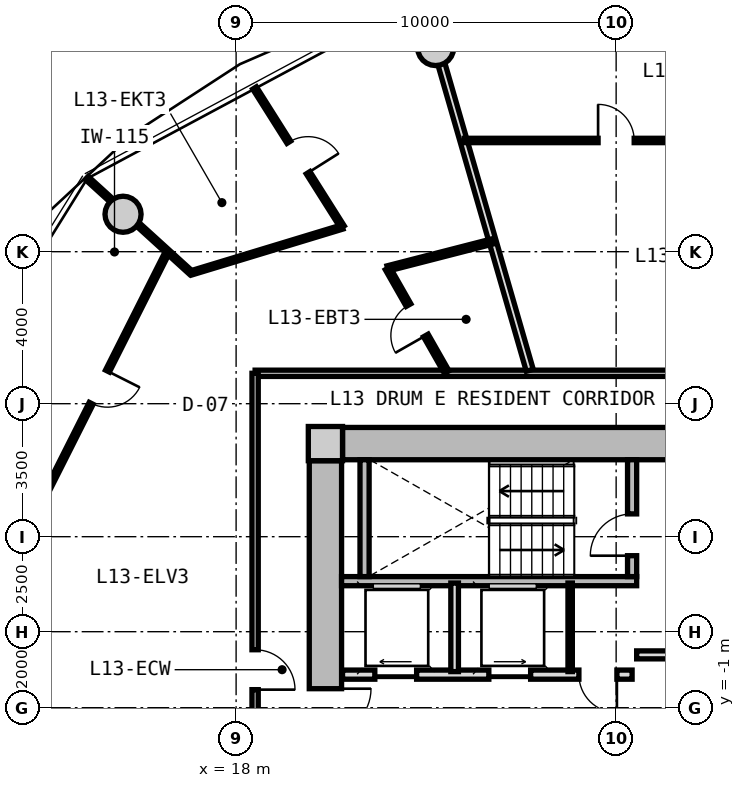
"""IFC4 building model, lengths in metres.
Left out: names, types, materials, properties, quantities, classifications, styles, units other than length and angle.
Written with IfcOpenShell. Run it as: python <this file> out.ifc"""

import sys

from ifc_helpers import new_model, si_unit, direction, frame, frame_2d, origin, origin_2d, place, context, subcontext, project, spatial, rectangle, circle, extrude, source, transform, mapped, element, fill, save


model = new_model("IFC4")
c1 = context("Model", 3, precision=1e-05, world=origin(), true_north=direction((0.0, 1.0)))
c2 = subcontext(c1, "Body", "Model", "MODEL_VIEW")
j1 = project(units=[si_unit("LENGTHUNIT", "METRE"), si_unit("PLANEANGLEUNIT", "RADIAN")], contexts=[c1])
p1 = place(None, origin())
s1 = spatial("IfcSite", under=j1, at=p1, CompositionType="ELEMENT")
p2 = place(p1, origin())
s2 = spatial("IfcBuilding", under=s1, at=p2, CompositionType="ELEMENT")
p3 = place(p2, frame((0.0, 0.0, 46.0)))
s3 = spatial("IfcBuildingStorey", under=s2, at=p3, CompositionType="ELEMENT", Elevation=46.0)
m1 = source(origin(), c2, "Body", "SweptSolid", [
    extrude(rectangle(XDim=0.9, YDim=0.9, at=origin_2d()), origin(), (0.0, 0.0, 1.0), 3.05),
])
p4 = place(p3, frame((20.35, 5.95, 0.0), z_axis=(0.0, 0.0, 1.0), x_axis=(1.0, 0.0, 0.0)))
e1 = element("IfcColumn", 1, at=p4, inside=s3, PredefinedType="COLUMN", context=c2, shape_type="MappedRepresentation", body=[
    mapped(m1, transform((0.0, 0.0, 0.0), x_axis=(1.0, 0.0, 0.0), y_axis=(0.0, 1.0, 0.0), z_axis=(0.0, 0.0, 1.0), scale=1.0)),
])
m2 = source(origin(), c2, "Body", "SweptSolid", [
    extrude(rectangle(XDim=14.4, YDim=0.85, at=frame_2d((7.2, 0.0))), origin(), (0.0, 0.0, 1.0), 2.79),
])
p5 = place(p3, frame((20.8, 5.95, 0.0), z_axis=(0.0, 0.0, 1.0), x_axis=(1.0, 0.0, 0.0)))
e2 = element("IfcWall", 2, at=p5, inside=s3, PredefinedType="SHEAR", context=c2, shape_type="MappedRepresentation", body=[
    mapped(m2, transform((0.0, 0.0, 0.0), x_axis=(1.0, 0.0, 0.0), y_axis=(0.0, 1.0, 0.0), z_axis=(0.0, 0.0, 1.0), scale=1.0)),
])
m3 = source(origin(), c2, "Body", "SweptSolid", [
    extrude(rectangle(XDim=11.0, YDim=0.85, at=frame_2d((5.5, 0.0))), origin(), (0.0, 0.0, 1.0), 2.79),
])
p6 = place(p3, frame((20.35, -5.5, 0.0), z_axis=(0.0, 0.0, 1.0), x_axis=(0.0, 1.0, 0.0)))
e3 = element("IfcWall", 3, at=p6, inside=s3, PredefinedType="SHEAR", context=c2, shape_type="MappedRepresentation", body=[
    mapped(m3, transform((0.0, 0.0, 0.0), x_axis=(1.0, 0.0, 0.0), y_axis=(0.0, 1.0, 0.0), z_axis=(0.0, 0.0, 1.0), scale=1.0)),
])
p7 = place(p6, frame((3.8, 0.0, 0.0)))
e4 = element("IfcOpeningElement", 4, at=p7, cuts=e3, PredefinedType="OPENING", context=c2, shape_type="SweptSolid", body=[
    extrude(rectangle(XDim=1.2, YDim=2.15, at=frame_2d((0.6, 1.075))), frame((0.0, 0.435, 0.0), z_axis=(0.0, -1.0, 0.0), x_axis=(1.0, 0.0, 0.0)), (0.0, 0.0, 1.0), 0.87),
])
m4 = source(origin(), c2, "Body", "SweptSolid", [
    extrude(circle(Radius=0.475, at=origin_2d()), origin(), (0.0, 0.0, 1.0), 3.05),
])
for number, where, z_axis, x_axis in (
    (5, (23.251, 16.373, 0.0), (0.0, 0.0, 1.0), (1.0, 0.0, 0.0)),
    (6, (15.025, 11.985, 0.0), (0.0, 0.0, 1.0), (1.0, 0.0, 0.0)),
):
    element("IfcColumn", number, at=place(p3, frame(where, z_axis=z_axis, x_axis=x_axis)), inside=s3, PredefinedType="COLUMN", context=c2, shape_type="MappedRepresentation", body=[
        mapped(m4, transform((0.0, 0.0, 0.0), x_axis=(1.0, 0.0, 0.0), y_axis=(0.0, 1.0, 0.0), z_axis=(0.0, 0.0, 1.0), scale=1.0)),
    ])
m5 = source(origin(), c2, "Body", "SweptSolid", [
    extrude(rectangle(XDim=7.765, YDim=0.24, at=frame_2d((3.883, 0.0))), origin(), (0.0, 0.0, 1.0), 2.79),
])
p8 = place(p3, frame((20.775, 2.33, 0.0), z_axis=(0.0, 0.0, 1.0), x_axis=(1.0, 0.0, 0.0)))
e7 = element("IfcWall", 7, at=p8, inside=s3, PredefinedType="PARTITIONING", context=c2, shape_type="MappedRepresentation", body=[
    mapped(m5, transform((0.0, 0.0, 0.0), x_axis=(1.0, 0.0, 0.0), y_axis=(0.0, 1.0, 0.0), z_axis=(0.0, 0.0, 1.0), scale=1.0)),
])
m6 = source(origin(), c2, "Body", "SweptSolid", [
    extrude(rectangle(XDim=3.075, YDim=0.24, at=frame_2d((1.538, 0.0))), origin(), (0.0, 0.0, 1.0), 2.79),
])
p9 = place(p3, frame((21.38, 2.45, 0.0), z_axis=(0.0, 0.0, 1.0), x_axis=(0.0, 1.0, 0.0)))
e8 = element("IfcWall", 8, at=p9, inside=s3, PredefinedType="PARTITIONING", context=c2, shape_type="MappedRepresentation", body=[
    mapped(m6, transform((0.0, 0.0, 0.0), x_axis=(1.0, 0.0, 0.0), y_axis=(0.0, 1.0, 0.0), z_axis=(0.0, 0.0, 1.0), scale=1.0)),
])
p10 = place(p3, frame((28.42, 2.45, 0.0), z_axis=(0.0, 0.0, 1.0), x_axis=(0.0, 1.0, 0.0)))
e9 = element("IfcWall", 9, at=p10, inside=s3, PredefinedType="PARTITIONING", context=c2, shape_type="MappedRepresentation", body=[
    mapped(m6, transform((0.0, 0.0, 0.0), x_axis=(1.0, 0.0, 0.0), y_axis=(0.0, 1.0, 0.0), z_axis=(0.0, 0.0, 1.0), scale=1.0)),
])
p11 = place(p10, frame((0.55, 0.0, 0.0)))
e10 = element("IfcOpeningElement", 10, at=p11, cuts=e9, PredefinedType="OPENING", context=c2, shape_type="SweptSolid", body=[
    extrude(rectangle(XDim=1.1, YDim=2.15, at=frame_2d((0.55, 1.075))), frame((0.0, 0.13, 0.0), z_axis=(0.0, -1.0, 0.0), x_axis=(1.0, 0.0, 0.0)), (0.0, 0.0, 1.0), 0.26),
])
m7 = source(origin(), c2, "Body", "SweptSolid", [
    extrude(rectangle(XDim=6.66, YDim=0.21, at=frame_2d((3.33, 0.0))), origin(), (0.0, 0.0, 1.0), 2.775),
])
p12 = place(p3, frame((28.54, 0.39, 0.0), z_axis=(0.0, 0.0, 1.0), x_axis=(1.0, 0.0, 0.0)))
e11 = element("IfcWall", 11, at=p12, inside=s3, PredefinedType="PARTITIONING", context=c2, shape_type="MappedRepresentation", body=[
    mapped(m7, transform((0.0, 0.0, 0.0), x_axis=(1.0, 0.0, 0.0), y_axis=(0.0, 1.0, 0.0), z_axis=(0.0, 0.0, 1.0), scale=1.0)),
])
p13 = place(p12, frame((1.0, 0.0, 0.0)))
e12 = element("IfcOpeningElement", 12, at=p13, cuts=e11, PredefinedType="OPENING", context=c2, shape_type="SweptSolid", body=[
    extrude(rectangle(XDim=1.2, YDim=2.15, at=frame_2d((0.6, 1.075))), frame((0.0, 0.115, 0.0), z_axis=(0.0, -1.0, 0.0), x_axis=(1.0, 0.0, 0.0)), (0.0, 0.0, 1.0), 0.23),
])
m8 = source(origin(), c2, "Body", "SweptSolid", [
    extrude(rectangle(XDim=7.62, YDim=0.24, at=frame_2d((3.81, 0.0))), origin(), (0.0, 0.0, 1.0), 2.775),
])
p14 = place(p3, frame((20.8, -0.13, 0.0), z_axis=(0.0, 0.0, 1.0), x_axis=(1.0, 0.0, 0.0)))
e13 = element("IfcWall", 13, at=p14, inside=s3, PredefinedType="PARTITIONING", context=c2, shape_type="MappedRepresentation", body=[
    mapped(m8, transform((0.0, 0.0, 0.0), x_axis=(1.0, 0.0, 0.0), y_axis=(0.0, 1.0, 0.0), z_axis=(0.0, 0.0, 1.0), scale=1.0)),
])
p15 = place(p14, frame((6.22, 0.0, 0.0)))
e14 = element("IfcOpeningElement", 14, at=p15, cuts=e13, PredefinedType="OPENING", context=c2, shape_type="SweptSolid", body=[
    extrude(rectangle(XDim=1.0, YDim=2.1, at=frame_2d((0.5, 1.05))), frame((0.0, 0.13, 0.0), z_axis=(0.0, -1.0, 0.0), x_axis=(1.0, 0.0, 0.0)), (0.0, 0.0, 1.0), 0.26),
])
p16 = place(p14, frame((0.85, 0.0, 0.0)))
e15 = element("IfcOpeningElement", 15, at=p16, cuts=e13, PredefinedType="OPENING", context=c2, shape_type="SweptSolid", body=[
    extrude(rectangle(XDim=1.1, YDim=2.2, at=frame_2d((0.55, 1.1))), frame((0.0, 0.13, 0.0), z_axis=(0.0, -1.0, 0.0), x_axis=(1.0, 0.0, 0.0)), (0.0, 0.0, 1.0), 0.26),
])
p17 = place(p14, frame((3.85, 0.0, 0.0)))
e16 = element("IfcOpeningElement", 16, at=p17, cuts=e13, PredefinedType="OPENING", context=c2, shape_type="SweptSolid", body=[
    extrude(rectangle(XDim=1.1, YDim=2.2, at=frame_2d((0.55, 1.1))), frame((0.0, 0.13, 0.0), z_axis=(0.0, -1.0, 0.0), x_axis=(1.0, 0.0, 0.0)), (0.0, 0.0, 1.0), 0.26),
])
m9 = source(origin(), c2, "Body", "SweptSolid", [
    extrude(rectangle(XDim=2.33, YDim=0.115, at=frame_2d((1.165, 0.0))), origin(), (0.0, 0.0, 1.0), 2.775),
])
p18 = place(p3, frame((26.79, -0.05, 0.0), z_axis=(0.0, 0.0, 1.0), x_axis=(0.0, 1.0, 0.0)))
e17 = element("IfcWall", 17, at=p18, inside=s3, PredefinedType="PARTITIONING", context=c2, shape_type="MappedRepresentation", body=[
    mapped(m9, transform((0.0, 0.0, 0.0), x_axis=(1.0, 0.0, 0.0), y_axis=(0.0, 1.0, 0.0), z_axis=(0.0, 0.0, 1.0), scale=1.0)),
])
m10 = source(origin(), c2, "Body", "SweptSolid", [
    extrude(rectangle(XDim=2.33, YDim=0.2, at=frame_2d((1.165, 0.0))), origin(), (0.0, 0.0, 1.0), 2.775),
])
p19 = place(p3, frame((23.75, -0.05, 0.0), z_axis=(0.0, 0.0, 1.0), x_axis=(0.0, 1.0, 0.0)))
e18 = element("IfcWall", 18, at=p19, inside=s3, PredefinedType="PARTITIONING", context=c2, shape_type="MappedRepresentation", body=[
    mapped(m10, transform((0.0, 0.0, 0.0), x_axis=(1.0, 0.0, 0.0), y_axis=(0.0, 1.0, 0.0), z_axis=(0.0, 0.0, 1.0), scale=1.0)),
])
m11 = source(origin(), c2, "Body", "SweptSolid", [
    extrude(rectangle(XDim=19.0, YDim=0.165, at=frame_2d((9.5, 0.0))), origin(), (0.0, 0.0, 1.0), 2.775),
])
p20 = place(p3, frame((18.5, 7.8, 0.0), z_axis=(0.0, 0.0, 1.0), x_axis=(1.0, 0.0, 0.0)))
e19 = element("IfcWall", 19, at=p20, inside=s3, PredefinedType="PARTITIONING", context=c2, shape_type="MappedRepresentation", body=[
    mapped(m11, transform((0.0, 0.0, 0.0), x_axis=(1.0, 0.0, 0.0), y_axis=(0.0, 1.0, 0.0), z_axis=(0.0, 0.0, 1.0), scale=1.0)),
])
p21 = place(p20, frame((12.462, 0.0, 0.0)))
e20 = element("IfcOpeningElement", 20, at=p21, cuts=e19, PredefinedType="OPENING", context=c2, shape_type="SweptSolid", body=[
    extrude(rectangle(XDim=1.05, YDim=2.15, at=frame_2d((0.525, 1.075))), frame((0.0, 0.093, 0.0), z_axis=(0.0, -1.0, 0.0), x_axis=(1.0, 0.0, 0.0)), (0.0, 0.0, 1.0), 0.185),
])
m12 = source(origin(), c2, "Body", "SweptSolid", [
    extrude(rectangle(XDim=15.6, YDim=0.165, at=frame_2d((7.8, 0.0))), origin(), (0.0, 0.0, 1.0), 2.775),
])
p22 = place(p3, frame((18.5, -7.8, 0.0), z_axis=(0.0, 0.0, 1.0), x_axis=(0.0, 1.0, 0.0)))
e21 = element("IfcWall", 21, at=p22, inside=s3, PredefinedType="PARTITIONING", context=c2, shape_type="MappedRepresentation", body=[
    mapped(m12, transform((0.0, 0.0, 0.0), x_axis=(1.0, 0.0, 0.0), y_axis=(0.0, 1.0, 0.0), z_axis=(0.0, 0.0, 1.0), scale=1.0)),
])
p23 = place(p22, frame((7.275, 0.0, 0.0)))
e22 = element("IfcOpeningElement", 22, at=p23, cuts=e21, PredefinedType="OPENING", context=c2, shape_type="SweptSolid", body=[
    extrude(rectangle(XDim=1.05, YDim=2.15, at=frame_2d((0.525, 1.075))), frame((0.0, 0.093, 0.0), z_axis=(0.0, -1.0, 0.0), x_axis=(1.0, 0.0, 0.0)), (0.0, 0.0, 1.0), 0.185),
])
m13 = source(origin(), c2, "Body", "SweptSolid", [
    extrude(rectangle(XDim=10.196, YDim=0.19, at=frame_2d((5.098, 0.0))), origin(), (0.0, 0.0, 1.0), 2.225),
])
p24 = place(p3, frame((25.727, 7.88, 0.0), z_axis=(0.0, 0.0, 1.0), x_axis=(-0.277136420347, 0.960830580549, 0.0)))
e23 = element("IfcWall", 23, at=p24, inside=s3, PredefinedType="PARTITIONING", context=c2, shape_type="MappedRepresentation", body=[
    mapped(m13, transform((0.0, 0.0, 0.0), x_axis=(1.0, 0.0, 0.0), y_axis=(0.0, 1.0, 0.0), z_axis=(0.0, 0.0, 1.0), scale=1.0)),
])
m14 = source(origin(), c2, "Body", "SweptSolid", [
    extrude(rectangle(XDim=8.018, YDim=0.115, at=frame_2d((4.009, 0.0))), origin(), (0.0, 0.0, 1.0), 2.775),
])
p25 = place(p3, frame((16.205, 11.014, 0.0), z_axis=(0.0, 0.0, 1.0), x_axis=(-0.450134355233, -0.89296084026, 0.0)))
e24 = element("IfcWall", 24, at=p25, inside=s3, PredefinedType="PARTITIONING", context=c2, shape_type="MappedRepresentation", body=[
    mapped(m14, transform((0.0, 0.0, 0.0), x_axis=(1.0, 0.0, 0.0), y_axis=(0.0, 1.0, 0.0), z_axis=(0.0, 0.0, 1.0), scale=1.0)),
])
p26 = place(p25, frame((3.534, 0.0, 0.0)))
e25 = element("IfcOpeningElement", 25, at=p26, cuts=e24, PredefinedType="OPENING", context=c2, shape_type="SweptSolid", body=[
    extrude(rectangle(XDim=0.95, YDim=2.1, at=frame_2d((0.475, 1.05))), frame((0.0, 0.067, 0.0), z_axis=(0.0, -1.0, 0.0), x_axis=(1.0, 0.0, 0.0)), (0.0, 0.0, 1.0), 0.135),
])
m15 = source(origin(), c2, "Body", "SweptSolid", [
    extrude(rectangle(XDim=3.7, YDim=0.115, at=frame_2d((1.85, 0.0))), origin(), (0.0, 0.0, 1.0), 2.225),
])
p27 = place(p3, frame((16.808, 10.451, 0.0), z_axis=(0.0, 0.0, 1.0), x_axis=(-0.739922161065, 0.672692497033, 0.0)))
e26 = element("IfcWall", 26, at=p27, inside=s3, PredefinedType="PARTITIONING", context=c2, shape_type="MappedRepresentation", body=[
    mapped(m15, transform((0.0, 0.0, 0.0), x_axis=(1.0, 0.0, 0.0), y_axis=(0.0, 1.0, 0.0), z_axis=(0.0, 0.0, 1.0), scale=1.0)),
])
m16 = source(origin(), c2, "Body", "SweptSolid", [
    extrude(rectangle(XDim=3.141, YDim=0.14, at=frame_2d((1.571, 0.0))), origin(), (0.0, 0.0, 1.0), 2.775),
])
p28 = place(p3, frame((23.542, 7.83, 0.0), z_axis=(0.0, 0.0, 1.0), x_axis=(-0.494874486088, 0.868964465913, 0.0)))
e27 = element("IfcWall", 27, at=p28, inside=s3, PredefinedType="PARTITIONING", context=c2, shape_type="MappedRepresentation", body=[
    mapped(m16, transform((0.0, 0.0, 0.0), x_axis=(1.0, 0.0, 0.0), y_axis=(0.0, 1.0, 0.0), z_axis=(0.0, 0.0, 1.0), scale=1.0)),
])
p29 = place(p28, frame((1.111, 0.0, 0.0)))
e28 = element("IfcOpeningElement", 28, at=p29, cuts=e27, PredefinedType="OPENING", context=c2, shape_type="SweptSolid", body=[
    extrude(rectangle(XDim=0.92, YDim=2.1, at=frame_2d((0.46, 1.05))), frame((0.0, 0.08, 0.0), z_axis=(0.0, -1.0, 0.0), x_axis=(1.0, 0.0, 0.0)), (0.0, 0.0, 1.0), 0.16),
])
m17 = source(origin(), c2, "Body", "SweptSolid", [
    extrude(rectangle(XDim=2.868, YDim=0.14, at=frame_2d((1.434, 0.0))), origin(), (0.0, 0.0, 1.0), 2.775),
])
p30 = place(p3, frame((21.987, 10.56, 0.0), z_axis=(0.0, 0.0, 1.0), x_axis=(0.968467705195, 0.249139125778, 0.0)))
e29 = element("IfcWall", 29, at=p30, inside=s3, PredefinedType="PARTITIONING", context=c2, shape_type="MappedRepresentation", body=[
    mapped(m17, transform((0.0, 0.0, 0.0), x_axis=(1.0, 0.0, 0.0), y_axis=(0.0, 1.0, 0.0), z_axis=(0.0, 0.0, 1.0), scale=1.0)),
])
m18 = source(origin(), c2, "Body", "SweptSolid", [
    extrude(rectangle(XDim=4.326, YDim=0.115, at=frame_2d((2.163, 0.0))), origin(), (0.0, 0.0, 1.0), 2.775),
])
p31 = place(p3, frame((20.796, 11.651, 0.0), z_axis=(0.0, 0.0, 1.0), x_axis=(-0.534101263803, 0.845420510755, 0.0)))
e30 = element("IfcWall", 30, at=p31, inside=s3, PredefinedType="PARTITIONING", context=c2, shape_type="MappedRepresentation", body=[
    mapped(m18, transform((0.0, 0.0, 0.0), x_axis=(1.0, 0.0, 0.0), y_axis=(0.0, 1.0, 0.0), z_axis=(0.0, 0.0, 1.0), scale=1.0)),
])
p32 = place(p31, frame((1.688, 0.0, 0.0)))
e31 = element("IfcOpeningElement", 31, at=p32, cuts=e30, PredefinedType="OPENING", context=c2, shape_type="SweptSolid", body=[
    extrude(rectangle(XDim=0.95, YDim=2.1, at=frame_2d((0.475, 1.05))), frame((0.0, 0.067, 0.0), z_axis=(0.0, -1.0, 0.0), x_axis=(1.0, 0.0, 0.0)), (0.0, 0.0, 1.0), 0.135),
])
m19 = source(origin(), c2, "Body", "SweptSolid", [
    extrude(rectangle(XDim=4.159, YDim=0.115, at=frame_2d((2.079, 0.0))), origin(), (0.0, 0.0, 1.0), 2.415),
])
p33 = place(p3, frame((20.796, 11.651, 0.0), z_axis=(0.0, 0.0, 1.0), x_axis=(-0.956846477815, -0.290593905466, 0.0)))
e32 = element("IfcWall", 32, at=p33, inside=s3, PredefinedType="PARTITIONING", context=c2, shape_type="MappedRepresentation", body=[
    mapped(m19, transform((0.0, 0.0, 0.0), x_axis=(1.0, 0.0, 0.0), y_axis=(0.0, 1.0, 0.0), z_axis=(0.0, 0.0, 1.0), scale=1.0)),
])
m20 = source(origin(), c2, "Body", "SweptSolid", [
    extrude(rectangle(XDim=7.993, YDim=0.115, at=frame_2d((3.996, 0.0))), origin(), (0.0, 0.0, 1.0), 2.775),
])
p34 = place(p3, frame((31.996, 13.927, 0.0), z_axis=(0.0, 0.0, 1.0), x_axis=(-1.0, 0.0, 0.0)))
e33 = element("IfcWall", 33, at=p34, inside=s3, PredefinedType="PARTITIONING", context=c2, shape_type="MappedRepresentation", body=[
    mapped(m20, transform((0.0, 0.0, 0.0), x_axis=(1.0, 0.0, 0.0), y_axis=(0.0, 1.0, 0.0), z_axis=(0.0, 0.0, 1.0), scale=1.0)),
])
p35 = place(p34, frame((3.521, 0.0, 0.0)))
e34 = element("IfcOpeningElement", 34, at=p35, cuts=e33, PredefinedType="OPENING", context=c2, shape_type="SweptSolid", body=[
    extrude(rectangle(XDim=0.95, YDim=2.1, at=frame_2d((0.475, 1.05))), frame((0.0, 0.067, 0.0), z_axis=(0.0, -1.0, 0.0), x_axis=(1.0, 0.0, 0.0)), (0.0, 0.0, 1.0), 0.135),
])
m21 = source(origin(), c2, "Body", "SweptSolid", [
    extrude(rectangle(XDim=1.1, YDim=2.15, at=frame_2d((0.55, 1.075))), frame((0.0, 0.025, 0.0), z_axis=(0.0, -1.0, 0.0), x_axis=(1.0, 0.0, 0.0)), (0.0, 0.0, 1.0), 0.05),
])
p36 = place(p11, origin())
e35 = element("IfcDoor", 35, at=p36, inside=s3, OperationType="SINGLE_SWING_LEFT", PredefinedType="DOOR", context=c2, shape_type="MappedRepresentation", body=[
    mapped(m21, transform((0.0, 0.0, 0.0), x_axis=(1.0, 0.0, 0.0), y_axis=(0.0, 1.0, 0.0), z_axis=(0.0, 0.0, 1.0), scale=1.0)),
])
fill(e10, e35)
m22 = source(origin(), c2, "Body", "SweptSolid", [
    extrude(rectangle(XDim=1.2, YDim=2.15, at=frame_2d((0.6, 1.075))), frame((0.0, 0.025, 0.0), z_axis=(0.0, -1.0, 0.0), x_axis=(1.0, 0.0, 0.0)), (0.0, 0.0, 1.0), 0.05),
])
p37 = place(p7, frame((1.2, 0.0, 0.0), z_axis=(0.0, 0.0, 1.0), x_axis=(-1.0, 0.0, 0.0)))
e36 = element("IfcDoor", 36, at=p37, inside=s3, OperationType="SINGLE_SWING_LEFT", PredefinedType="DOOR", context=c2, shape_type="MappedRepresentation", body=[
    mapped(m22, transform((0.0, 0.0, 0.0), x_axis=(1.0, 0.0, 0.0), y_axis=(0.0, 1.0, 0.0), z_axis=(0.0, 0.0, 1.0), scale=1.0)),
])
fill(e4, e36)
m23 = source(origin(), c2, "Body", "SweptSolid", [
    extrude(rectangle(XDim=1.0, YDim=2.1, at=frame_2d((0.5, 1.05))), frame((0.0, 0.025, 0.0), z_axis=(0.0, -1.0, 0.0), x_axis=(1.0, 0.0, 0.0)), (0.0, 0.0, 1.0), 0.05),
])
p38 = place(p15, frame((1.0, 0.0, 0.0), z_axis=(0.0, 0.0, 1.0), x_axis=(-1.0, 0.0, 0.0)))
e37 = element("IfcDoor", 37, at=p38, inside=s3, OperationType="SINGLE_SWING_LEFT", PredefinedType="DOOR", context=c2, shape_type="MappedRepresentation", body=[
    mapped(m23, transform((0.0, 0.0, 0.0), x_axis=(1.0, 0.0, 0.0), y_axis=(0.0, 1.0, 0.0), z_axis=(0.0, 0.0, 1.0), scale=1.0)),
])
fill(e14, e37)
m24 = source(origin(), c2, "Body", "SweptSolid", [
    extrude(rectangle(XDim=1.1, YDim=2.2, at=frame_2d((0.55, 1.1))), frame((0.0, 0.025, 0.0), z_axis=(0.0, -1.0, 0.0), x_axis=(1.0, 0.0, 0.0)), (0.0, 0.0, 1.0), 0.05),
])
p39 = place(p16, origin())
e38 = element("IfcDoor", 38, at=p39, inside=s3, OperationType="SLIDING_TO_LEFT", PredefinedType="DOOR", context=c2, shape_type="MappedRepresentation", body=[
    mapped(m24, transform((0.0, 0.0, 0.0), x_axis=(1.0, 0.0, 0.0), y_axis=(0.0, 1.0, 0.0), z_axis=(0.0, 0.0, 1.0), scale=1.0)),
])
fill(e15, e38)
p40 = place(p17, origin())
e39 = element("IfcDoor", 39, at=p40, inside=s3, OperationType="SLIDING_TO_RIGHT", PredefinedType="DOOR", context=c2, shape_type="MappedRepresentation", body=[
    mapped(m24, transform((0.0, 0.0, 0.0), x_axis=(1.0, 0.0, 0.0), y_axis=(0.0, 1.0, 0.0), z_axis=(0.0, 0.0, 1.0), scale=1.0)),
])
fill(e16, e39)
m25 = source(origin(), c2, "Body", "SweptSolid", [
    extrude(rectangle(XDim=1.05, YDim=2.15, at=frame_2d((0.525, 1.075))), frame((0.0, 0.025, 0.0), z_axis=(0.0, -1.0, 0.0), x_axis=(1.0, 0.0, 0.0)), (0.0, 0.0, 1.0), 0.05),
])
p41 = place(p23, frame((1.05, 0.0, 0.0), z_axis=(0.0, 0.0, 1.0), x_axis=(-1.0, 0.0, 0.0)))
e40 = element("IfcDoor", 40, at=p41, inside=s3, OperationType="SINGLE_SWING_RIGHT", PredefinedType="DOOR", context=c2, shape_type="MappedRepresentation", body=[
    mapped(m25, transform((0.0, 0.0, 0.0), x_axis=(1.0, 0.0, 0.0), y_axis=(0.0, 1.0, 0.0), z_axis=(0.0, 0.0, 1.0), scale=1.0)),
])
fill(e22, e40)
m26 = source(origin(), c2, "Body", "SweptSolid", [
    extrude(rectangle(XDim=0.92, YDim=2.1, at=frame_2d((0.46, 1.05))), frame((0.0, 0.025, 0.0), z_axis=(0.0, -1.0, 0.0), x_axis=(1.0, 0.0, 0.0)), (0.0, 0.0, 1.0), 0.05),
])
p42 = place(p29, origin())
e41 = element("IfcDoor", 41, at=p42, inside=s3, OperationType="SINGLE_SWING_LEFT", PredefinedType="DOOR", context=c2, shape_type="MappedRepresentation", body=[
    mapped(m26, transform((0.0, 0.0, 0.0), x_axis=(1.0, 0.0, 0.0), y_axis=(0.0, 1.0, 0.0), z_axis=(0.0, 0.0, 1.0), scale=1.0)),
])
fill(e28, e41)
m27 = source(origin(), c2, "Body", "SweptSolid", [
    extrude(rectangle(XDim=0.95, YDim=2.1, at=frame_2d((0.475, 1.05))), frame((0.0, 0.025, 0.0), z_axis=(0.0, -1.0, 0.0), x_axis=(1.0, 0.0, 0.0)), (0.0, 0.0, 1.0), 0.05),
])
p43 = place(p32, frame((0.95, 0.0, 0.0), z_axis=(0.0, 0.0, 1.0), x_axis=(-1.0, 0.0, 0.0)))
e42 = element("IfcDoor", 42, at=p43, inside=s3, OperationType="SINGLE_SWING_RIGHT", PredefinedType="DOOR", context=c2, shape_type="MappedRepresentation", body=[
    mapped(m27, transform((0.0, 0.0, 0.0), x_axis=(1.0, 0.0, 0.0), y_axis=(0.0, 1.0, 0.0), z_axis=(0.0, 0.0, 1.0), scale=1.0)),
])
fill(e31, e42)
p44 = place(p26, origin())
e43 = element("IfcDoor", 43, at=p44, inside=s3, OperationType="SINGLE_SWING_LEFT", PredefinedType="DOOR", context=c2, shape_type="MappedRepresentation", body=[
    mapped(m27, transform((0.0, 0.0, 0.0), x_axis=(1.0, 0.0, 0.0), y_axis=(0.0, 1.0, 0.0), z_axis=(0.0, 0.0, 1.0), scale=1.0)),
])
fill(e25, e43)
p45 = place(p35, frame((0.95, 0.0, 0.0), z_axis=(0.0, 0.0, 1.0), x_axis=(-1.0, 0.0, 0.0)))
e44 = element("IfcDoor", 44, at=p45, inside=s3, OperationType="SINGLE_SWING_LEFT", PredefinedType="DOOR", context=c2, shape_type="MappedRepresentation", body=[
    mapped(m27, transform((0.0, 0.0, 0.0), x_axis=(1.0, 0.0, 0.0), y_axis=(0.0, 1.0, 0.0), z_axis=(0.0, 0.0, 1.0), scale=1.0)),
])
fill(e34, e44)
save(model, sys.argv[1])
